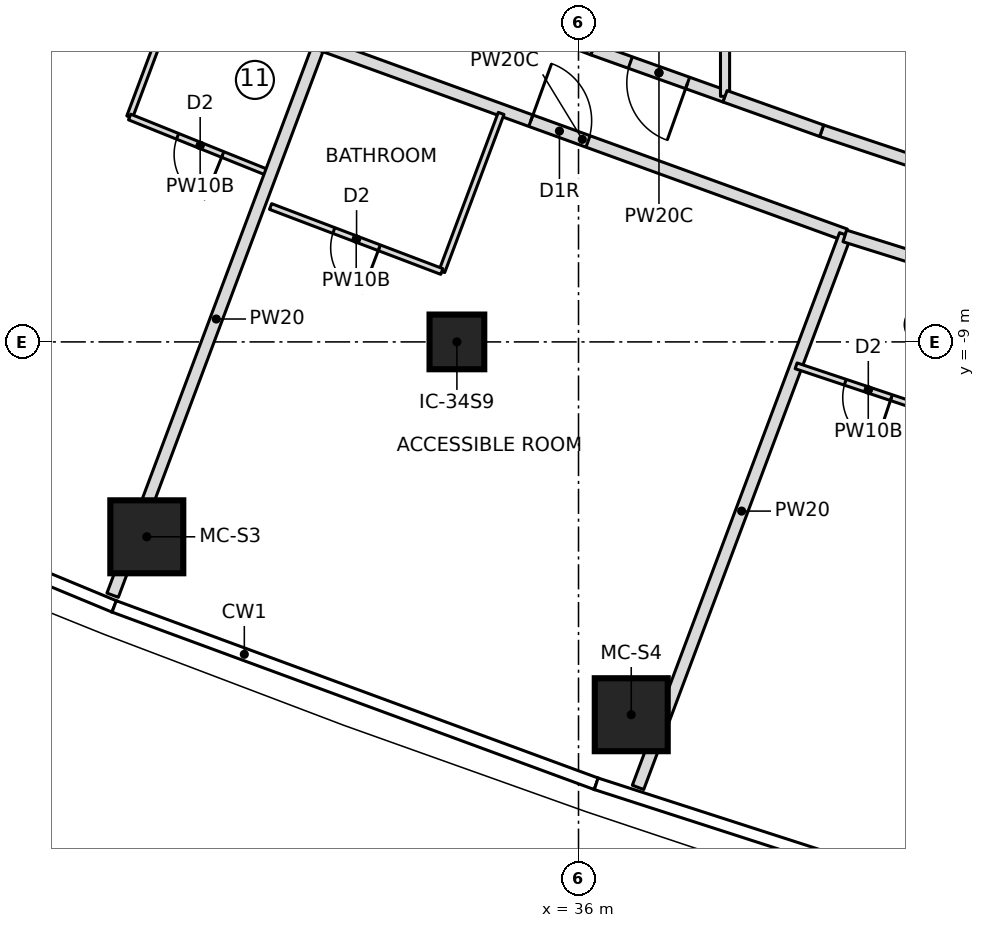
"""IFC4 building model, lengths in metres.
Left out: names, types, materials, properties, quantities, classifications, styles, units other than length and angle.
Written with IfcOpenShell. Run it as: python <this file> out.ifc"""

import sys

from ifc_helpers import new_model, si_unit, direction, frame, frame_2d, origin, origin_2d, place, context, subcontext, project, spatial, rectangle, extrude, element, fill, save


model = new_model("IFC4")
c1 = context("Model", 3, precision=1e-05, world=origin(), true_north=direction((0.0, 1.0)))
c2 = subcontext(c1, "Body", "Model", "MODEL_VIEW")
j1 = project(units=[si_unit("LENGTHUNIT", "METRE"), si_unit("PLANEANGLEUNIT", "RADIAN")], contexts=[c1])
p1 = place(None, origin())
s1 = spatial("IfcSite", under=j1, at=p1, CompositionType="ELEMENT")
p2 = place(p1, origin())
s2 = spatial("IfcBuilding", under=s1, at=p2, CompositionType="ELEMENT")
p3 = place(p2, frame((0.0, 0.0, 242.1)))
s3 = spatial("IfcBuildingStorey", under=s2, at=p3, CompositionType="ELEMENT", Elevation=242.1)
for number, where, z_axis, x_axis in (
    (1, (28.9, -12.205, 0.0), (0.0, 0.0, 1.0), (1.0, 0.0, 0.0)),
    (2, (36.867, -15.132, 0.0), (0.0, 0.0, 1.0), (1.0, 0.0, 0.0)),
):
    element("IfcColumn", number, at=place(p3, frame(where, z_axis=z_axis, x_axis=x_axis)), inside=s3, PredefinedType="COLUMN", context=c2, shape_type="SweptSolid", body=[
        extrude(rectangle(XDim=1.2, YDim=1.2, at=origin_2d()), origin(), (0.0, 0.0, 1.0), 3.55),
    ])
p4 = place(p3, frame((34.0, -9.0, 0.0), z_axis=(0.0, 0.0, 1.0), x_axis=(1.0, 0.0, 0.0)))
e3 = element("IfcColumn", 3, at=p4, inside=s3, PredefinedType="COLUMN", context=c2, shape_type="SweptSolid", body=[
    extrude(rectangle(XDim=0.9, YDim=0.9, at=origin_2d()), origin(), (0.0, 0.0, 1.0), 3.55),
])
p5 = place(p3, frame((28.618, -5.301, 0.0), z_axis=(0.0, 0.0, 1.0), x_axis=(0.351064703731, 0.936351202164, 0.0)))
e4 = element("IfcWall", 4, at=p5, inside=s3, PredefinedType="PARTITIONING", context=c2, shape_type="SweptSolid", body=[
    extrude(rectangle(XDim=2.278, YDim=0.1, at=frame_2d((1.139, 0.0))), origin(), (0.0, 0.0, 1.0), 3.25),
])
p6 = place(p3, frame((30.938, -6.235, 0.0), z_axis=(0.0, 0.0, 1.0), x_axis=(-0.92761232595, 0.373544338394, 0.0)))
e5 = element("IfcWall", 5, at=p6, inside=s3, PredefinedType="PARTITIONING", context=c2, shape_type="SweptSolid", body=[
    extrude(rectangle(XDim=2.5, YDim=0.1, at=frame_2d((1.25, 0.0))), origin(), (0.0, 0.0, 1.0), 3.25),
])
p7 = place(p6, frame((0.85, 0.0, 0.0)))
e6 = element("IfcOpeningElement", 6, at=p7, cuts=e5, PredefinedType="OPENING", context=c2, shape_type="SweptSolid", body=[
    extrude(rectangle(XDim=0.8, YDim=2.1, at=frame_2d((0.4, 1.05))), frame((0.0, 0.06, 0.0), z_axis=(0.0, -1.0, 0.0), x_axis=(1.0, 0.0, 0.0)), (0.0, 0.0, 1.0), 0.12),
])
p8 = place(p3, frame((28.338, -13.166, 0.0), z_axis=(0.0, 0.0, 1.0), x_axis=(0.351126198992, 0.936328143538, 0.0)))
e7 = element("IfcWall", 7, at=p8, inside=s3, PredefinedType="PARTITIONING", context=c2, shape_type="SweptSolid", body=[
    extrude(rectangle(XDim=9.703, YDim=0.2, at=frame_2d((4.852, 0.0))), origin(), (0.0, 0.0, 1.0), 3.25),
])
p9 = place(p3, frame((31.738, -4.1, 0.0), z_axis=(0.0, 0.0, 1.0), x_axis=(0.940010170527, -0.341146419159, 0.0)))
e8 = element("IfcWall", 8, at=p9, inside=s3, PredefinedType="PARTITIONING", context=c2, shape_type="SweptSolid", body=[
    extrude(rectangle(XDim=9.2, YDim=0.2, at=frame_2d((4.6, 0.0))), origin(), (0.0, 0.0, 1.0), 3.25),
])
p10 = place(p9, frame((3.7, 0.0, 0.0)))
e9 = element("IfcOpeningElement", 9, at=p10, cuts=e8, PredefinedType="OPENING", context=c2, shape_type="SweptSolid", body=[
    extrude(rectangle(XDim=1.0, YDim=2.1, at=frame_2d((0.5, 1.05))), frame((0.0, 0.11, 0.0), z_axis=(0.0, -1.0, 0.0), x_axis=(1.0, 0.0, 0.0)), (0.0, 0.0, 1.0), 0.22),
])
p11 = place(p3, frame((34.728, -5.242, 0.0), z_axis=(0.0, 0.0, 1.0), x_axis=(-0.351113807562, -0.936332790272, 0.0)))
e10 = element("IfcWall", 10, at=p11, inside=s3, PredefinedType="PARTITIONING", context=c2, shape_type="SweptSolid", body=[
    extrude(rectangle(XDim=2.777, YDim=0.1, at=frame_2d((1.389, 0.0))), origin(), (0.0, 0.0, 1.0), 3.25),
])
p12 = place(p3, frame((33.752, -7.842, 0.0), z_axis=(0.0, 0.0, 1.0), x_axis=(-0.934929871592, 0.354832545302, 0.0)))
e11 = element("IfcWall", 11, at=p12, inside=s3, PredefinedType="PARTITIONING", context=c2, shape_type="SweptSolid", body=[
    extrude(rectangle(XDim=3.013, YDim=0.1, at=frame_2d((1.506, 0.0))), origin(), (0.0, 0.0, 1.0), 3.25),
])
p13 = place(p12, frame((1.1, 0.0, 0.0)))
e12 = element("IfcOpeningElement", 12, at=p13, cuts=e11, PredefinedType="OPENING", context=c2, shape_type="SweptSolid", body=[
    extrude(rectangle(XDim=0.8, YDim=2.1, at=frame_2d((0.4, 1.05))), frame((0.0, 0.06, 0.0), z_axis=(0.0, -1.0, 0.0), x_axis=(1.0, 0.0, 0.0)), (0.0, 0.0, 1.0), 0.12),
])
p14 = place(p3, frame((36.979, -16.327, 0.0), z_axis=(0.0, 0.0, 1.0), x_axis=(0.351098633881, 0.936338480084, 0.0)))
e13 = element("IfcWall", 13, at=p14, inside=s3, PredefinedType="PARTITIONING", context=c2, shape_type="SweptSolid", body=[
    extrude(rectangle(XDim=9.707, YDim=0.2, at=frame_2d((4.853, 0.0))), origin(), (0.0, 0.0, 1.0), 3.25),
])
p15 = place(p3, frame((41.951, -10.186, 0.0), z_axis=(0.0, 0.0, 1.0), x_axis=(-0.948468383404, 0.316871781141, 0.0)))
e14 = element("IfcWall", 14, at=p15, inside=s3, PredefinedType="PARTITIONING", context=c2, shape_type="SweptSolid", body=[
    extrude(rectangle(XDim=2.502, YDim=0.1, at=frame_2d((1.251, 0.0))), origin(), (0.0, 0.0, 1.0), 3.25),
])
p16 = place(p15, frame((0.85, 0.0, 0.0)))
e15 = element("IfcOpeningElement", 15, at=p16, cuts=e14, PredefinedType="OPENING", context=c2, shape_type="SweptSolid", body=[
    extrude(rectangle(XDim=0.8, YDim=2.1, at=frame_2d((0.4, 1.05))), frame((0.0, 0.06, 0.0), z_axis=(0.0, -1.0, 0.0), x_axis=(1.0, 0.0, 0.0)), (0.0, 0.0, 1.0), 0.12),
])
p17 = place(p3, frame((38.41, -4.961, 0.0), z_axis=(0.0, 0.0, 1.0), x_axis=(-0.941897392466, 0.335900732459, 0.0)))
e16 = element("IfcWall", 16, at=p17, inside=s3, PredefinedType="PARTITIONING", context=c2, shape_type="SweptSolid", body=[
    extrude(rectangle(XDim=2.308, YDim=0.2, at=frame_2d((1.154, 0.0))), origin(), (0.0, 0.0, 1.0), 3.25),
])
p18 = place(p17, frame((0.654, 0.0, 0.0)))
e17 = element("IfcOpeningElement", 17, at=p18, cuts=e16, PredefinedType="OPENING", context=c2, shape_type="SweptSolid", body=[
    extrude(rectangle(XDim=1.0, YDim=2.1, at=frame_2d((0.5, 1.05))), frame((0.0, 0.11, 0.0), z_axis=(0.0, -1.0, 0.0), x_axis=(1.0, 0.0, 0.0)), (0.0, 0.0, 1.0), 0.22),
])
p19 = place(p3, frame((36.236, -4.186, 0.0), z_axis=(0.0, 0.0, 1.0), x_axis=(-0.934902750064, 0.354903998178, 0.0)))
e18 = element("IfcWall", 18, at=p19, inside=s3, PredefinedType="PARTITIONING", context=c2, shape_type="SweptSolid", body=[
    extrude(rectangle(XDim=0.884, YDim=0.2, at=frame_2d((0.442, 0.0))), origin(), (0.0, 0.0, 1.0), 3.25),
])
p20 = place(p3, frame((38.41, -4.961, 0.0), z_axis=(0.0, 0.0, 1.0), x_axis=(0.0, 1.0, 0.0)))
e19 = element("IfcWall", 19, at=p20, inside=s3, PredefinedType="PARTITIONING", context=c2, shape_type="SweptSolid", body=[
    extrude(rectangle(XDim=9.921, YDim=0.15, at=frame_2d((4.961, 0.0))), origin(), (0.0, 0.0, 1.0), 3.25),
])
p21 = place(p3, frame((42.486, -6.358, 0.0), z_axis=(0.0, 0.0, 1.0), x_axis=(-0.948459565489, 0.316898173918, 0.0)))
e20 = element("IfcWall", 20, at=p21, inside=s3, PredefinedType="PARTITIONING", context=c2, shape_type="SweptSolid", body=[
    extrude(rectangle(XDim=2.622, YDim=0.2, at=frame_2d((1.311, 0.0))), origin(), (0.0, 0.0, 1.0), 3.25),
])
p22 = place(p3, frame((39.999, -5.527, 0.0), z_axis=(0.0, 0.0, 1.0), x_axis=(-0.941925088036, 0.335823061341, 0.0)))
e21 = element("IfcWall", 21, at=p22, inside=s3, PredefinedType="PARTITIONING", context=c2, shape_type="SweptSolid", body=[
    extrude(rectangle(XDim=1.687, YDim=0.2, at=frame_2d((0.844, 0.0))), origin(), (0.0, 0.0, 1.0), 3.25),
])
p23 = place(p3, frame((40.38, -7.257, 0.0), z_axis=(0.0, 0.0, 1.0), x_axis=(0.954235234728, -0.299057046068, 0.0)))
e22 = element("IfcWall", 22, at=p23, inside=s3, PredefinedType="PARTITIONING", context=c2, shape_type="SweptSolid", body=[
    extrude(rectangle(XDim=8.3, YDim=0.2, at=frame_2d((4.15, 0.0))), origin(), (0.0, 0.0, 1.0), 3.25),
])
p24 = place(p23, frame((2.8, 0.0, 0.0)))
e23 = element("IfcOpeningElement", 23, at=p24, cuts=e22, PredefinedType="OPENING", context=c2, shape_type="SweptSolid", body=[
    extrude(rectangle(XDim=1.5, YDim=2.1, at=frame_2d((0.75, 1.05))), frame((0.0, 0.11, 0.0), z_axis=(0.0, -1.0, 0.0), x_axis=(1.0, 0.0, 0.0)), (0.0, 0.0, 1.0), 0.22),
])
p25 = place(p7, origin())
e24 = element("IfcDoor", 24, at=p25, inside=s3, OperationType="SINGLE_SWING_LEFT", PredefinedType="DOOR", context=c2, shape_type="SweptSolid", body=[
    extrude(rectangle(XDim=0.8, YDim=2.1, at=frame_2d((0.4, 1.05))), frame((0.0, 0.025, 0.0), z_axis=(0.0, -1.0, 0.0), x_axis=(1.0, 0.0, 0.0)), (0.0, 0.0, 1.0), 0.05),
])
fill(e6, e24)
p26 = place(p13, origin())
e25 = element("IfcDoor", 25, at=p26, inside=s3, OperationType="SINGLE_SWING_LEFT", PredefinedType="DOOR", context=c2, shape_type="SweptSolid", body=[
    extrude(rectangle(XDim=0.8, YDim=2.1, at=frame_2d((0.4, 1.05))), frame((0.0, 0.025, 0.0), z_axis=(0.0, -1.0, 0.0), x_axis=(1.0, 0.0, 0.0)), (0.0, 0.0, 1.0), 0.05),
])
fill(e12, e25)
p27 = place(p10, origin())
e26 = element("IfcDoor", 26, at=p27, inside=s3, OperationType="SINGLE_SWING_RIGHT", PredefinedType="DOOR", context=c2, shape_type="SweptSolid", body=[
    extrude(rectangle(XDim=1.0, YDim=2.1, at=frame_2d((0.5, 1.05))), frame((0.0, 0.025, 0.0), z_axis=(0.0, -1.0, 0.0), x_axis=(1.0, 0.0, 0.0)), (0.0, 0.0, 1.0), 0.05),
])
fill(e9, e26)
p28 = place(p16, origin())
e27 = element("IfcDoor", 27, at=p28, inside=s3, OperationType="SINGLE_SWING_LEFT", PredefinedType="DOOR", context=c2, shape_type="SweptSolid", body=[
    extrude(rectangle(XDim=0.8, YDim=2.1, at=frame_2d((0.4, 1.05))), frame((0.0, 0.025, 0.0), z_axis=(0.0, -1.0, 0.0), x_axis=(1.0, 0.0, 0.0)), (0.0, 0.0, 1.0), 0.05),
])
fill(e15, e27)
p29 = place(p18, origin())
e28 = element("IfcDoor", 28, at=p29, inside=s3, OperationType="SINGLE_SWING_RIGHT", PredefinedType="DOOR", context=c2, shape_type="SweptSolid", body=[
    extrude(rectangle(XDim=1.0, YDim=2.1, at=frame_2d((0.5, 1.05))), frame((0.0, 0.025, 0.0), z_axis=(0.0, -1.0, 0.0), x_axis=(1.0, 0.0, 0.0)), (0.0, 0.0, 1.0), 0.05),
])
fill(e17, e28)
save(model, sys.argv[1])
